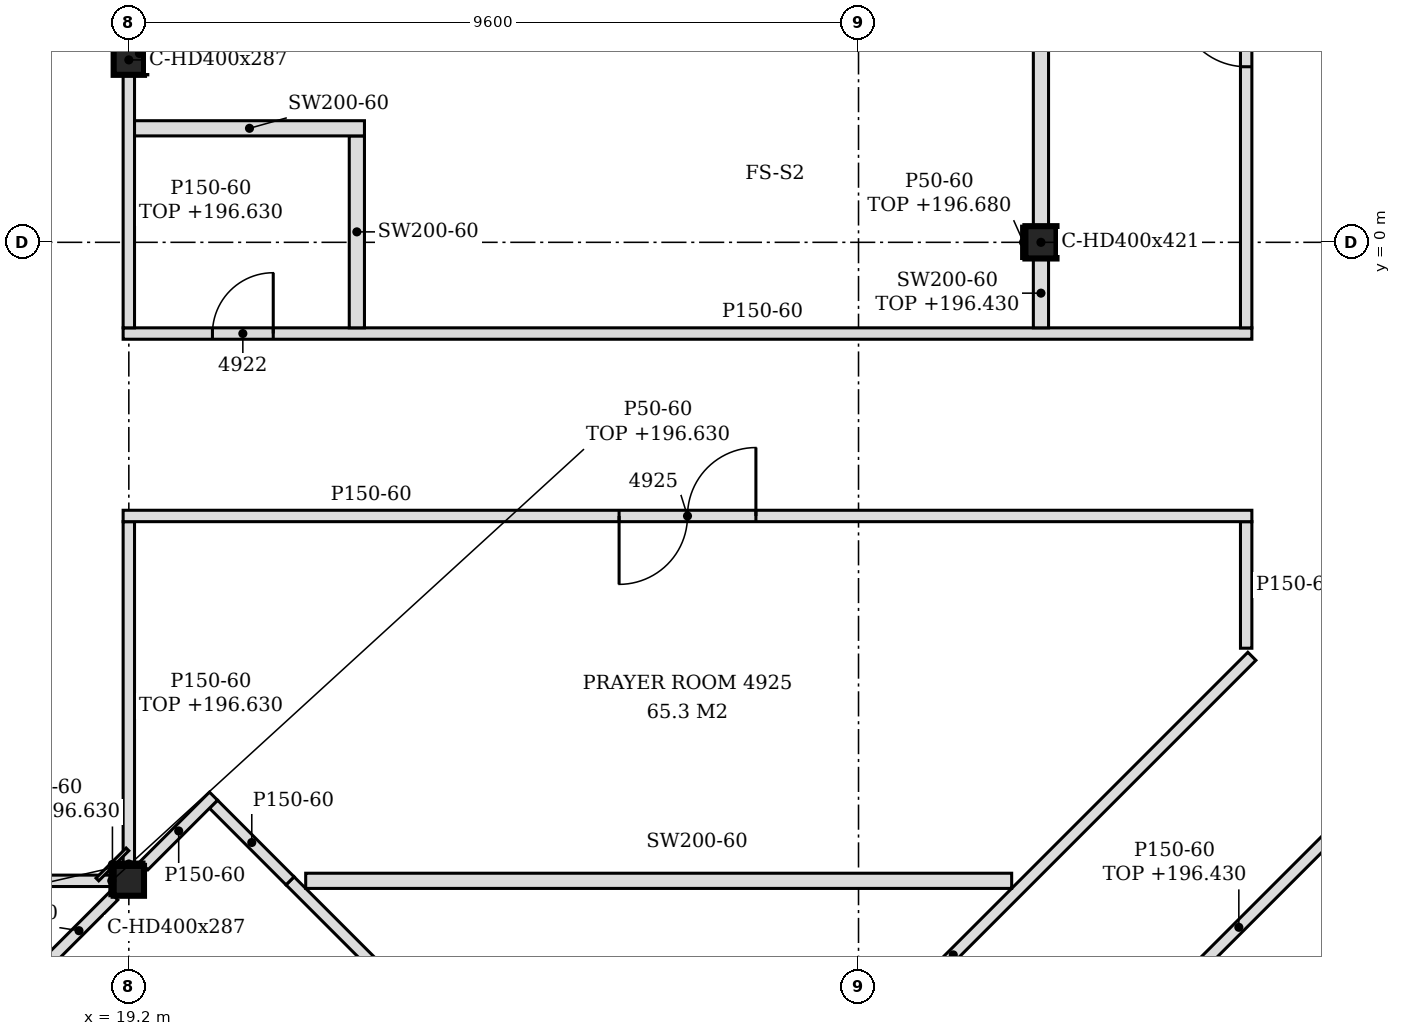
"""IFC4 building model, lengths in metres.
Left out: names, types, materials, properties, quantities, classifications, styles, units other than length and angle.
Written with IfcOpenShell. Run it as: python <this file> out.ifc"""

import sys

from ifc_helpers import new_model, si_unit, direction, frame, frame_2d, origin, origin_2d, place, context, subcontext, project, spatial, polyline, rectangle, i_section, outline, extrude, element, fill, save


model = new_model("IFC4")
c1 = context("Model", 3, precision=1e-05, world=origin(), true_north=direction((0.0, 1.0)))
c2 = subcontext(c1, "Body", "Model", "MODEL_VIEW")
j1 = project(units=[si_unit("LENGTHUNIT", "METRE"), si_unit("PLANEANGLEUNIT", "RADIAN")], contexts=[c1])
p1 = place(None, origin())
s1 = spatial("IfcSite", under=j1, at=p1, CompositionType="ELEMENT")
p2 = place(p1, origin())
s2 = spatial("IfcBuilding", under=s1, at=p2, CompositionType="ELEMENT")
p3 = place(p2, frame((0.0, 0.0, 193.8)))
s3 = spatial("IfcBuildingStorey", under=s2, at=p3, CompositionType="ELEMENT", Elevation=193.8)
for number, where, z_axis, x_axis in (
    (1, (19.2, -8.4, -0.15), (0.0, 0.0, 1.0), (1.0, 0.0, 0.0)),
    (2, (19.2, 2.4, -0.15), (0.0, 0.0, 1.0), (1.0, 0.0, 0.0)),
):
    element("IfcColumn", number, at=place(p3, frame(where, z_axis=z_axis, x_axis=x_axis)), inside=s3, PredefinedType="COLUMN", context=c2, shape_type="SweptSolid", body=[
        extrude(i_section(OverallWidth=0.399, OverallDepth=0.393, WebThickness=0.023, FlangeThickness=0.037, FilletRadius=0.015, at=origin_2d()), origin(), (0.0, 0.0, 1.0), 3.6),
    ])
p4 = place(p3, frame((31.2, 0.0, -0.15), z_axis=(0.0, 0.0, 1.0), x_axis=(1.0, 0.0, 0.0)))
e3 = element("IfcColumn", 3, at=p4, inside=s3, PredefinedType="COLUMN", context=c2, shape_type="SweptSolid", body=[
    extrude(i_section(OverallWidth=0.409, OverallDepth=0.425, WebThickness=0.033, FlangeThickness=0.052, FilletRadius=0.015, at=origin_2d()), origin(), (0.0, 0.0, 1.0), 3.6),
])
p5 = place(p3, frame((25.543, -17.272, 0.0), z_axis=(0.0, 0.0, 1.0), x_axis=(0.707106781187, 0.707106781187, 0.0)))
e4 = element("IfcWall", 4, at=p5, inside=s3, PredefinedType="PARTITIONING", context=c2, shape_type="SweptSolid", body=[
    extrude(rectangle(XDim=15.319, YDim=0.15, at=frame_2d((7.659, 0.0))), origin(), (0.0, 0.0, 1.0), 2.63),
])
p6 = place(p5, frame((1.623, 0.0, 0.0)))
e5 = element("IfcOpeningElement", 5, at=p6, cuts=e4, PredefinedType="OPENING", context=c2, shape_type="SweptSolid", body=[
    extrude(rectangle(XDim=0.9, YDim=2.1, at=frame_2d((0.45, 1.05))), frame((0.0, 0.085, 0.0), z_axis=(0.0, -1.0, 0.0), x_axis=(1.0, 0.0, 0.0)), (0.0, 0.0, 1.0), 0.17),
])
p7 = place(p5, frame((7.145, 0.0, 0.0)))
e6 = element("IfcOpeningElement", 6, at=p7, cuts=e4, PredefinedType="OPENING", context=c2, shape_type="SweptSolid", body=[
    extrude(rectangle(XDim=0.9, YDim=2.1, at=frame_2d((0.45, 1.05))), frame((0.0, 0.085, 0.0), z_axis=(0.0, -1.0, 0.0), x_axis=(1.0, 0.0, 0.0)), (0.0, 0.0, 1.0), 0.17),
])
p8 = place(p3, frame((26.118, -13.303, 0.0), z_axis=(0.0, 0.0, 1.0), x_axis=(0.707117766991, 0.707095795212, 0.0)))
e7 = element("IfcWall", 7, at=p8, inside=s3, PredefinedType="PARTITIONING", context=c2, shape_type="SweptSolid", body=[
    extrude(rectangle(XDim=11.112, YDim=0.15, at=frame_2d((5.556, 0.0))), origin(), (0.0, 0.0, 1.0), 2.63),
])
p9 = place(p3, frame((26.118, -13.197, 0.0), z_axis=(0.0, 0.0, 1.0), x_axis=(-0.707088787045, 0.70712477487, 0.0)))
e8 = element("IfcWall", 8, at=p9, inside=s3, PredefinedType="PARTITIONING", context=c2, shape_type="SweptSolid", body=[
    extrude(rectangle(XDim=6.784, YDim=0.15, at=frame_2d((3.392, 0.0))), origin(), (0.0, 0.0, 1.0), 2.88),
])
p10 = place(p9, frame((2.905, 0.0, 0.0)))
e9 = element("IfcOpeningElement", 9, at=p10, cuts=e8, PredefinedType="OPENING", context=c2, shape_type="SweptSolid", body=[
    extrude(rectangle(XDim=0.9, YDim=2.1, at=frame_2d((0.45, 1.05))), frame((0.0, 0.085, 0.0), z_axis=(0.0, -1.0, 0.0), x_axis=(1.0, 0.0, 0.0)), (0.0, 0.0, 1.0), 0.17),
])
p11 = place(p3, frame((18.086, -9.514, 0.0), z_axis=(0.0, 0.0, 1.0), x_axis=(0.707106781187, 0.707106781187, 0.0)))
e10 = element("IfcWall", 10, at=p11, inside=s3, PredefinedType="PARTITIONING", context=c2, shape_type="SweptSolid", body=[
    extrude(rectangle(XDim=1.295, YDim=0.15, at=frame_2d((0.648, 0.0))), origin(), (0.0, 0.0, 1.0), 3.45),
])
p12 = place(p3, frame((7.399, -8.4, 0.0), z_axis=(0.0, 0.0, 1.0), x_axis=(1.0, 0.0, 0.0)))
e11 = element("IfcWall", 11, at=p12, inside=s3, PredefinedType="PARTITIONING", context=c2, shape_type="SweptSolid", body=[
    extrude(rectangle(XDim=11.601, YDim=0.15, at=frame_2d((5.801, 0.0))), origin(), (0.0, 0.0, 1.0), 2.83),
])
p13 = place(p12, frame((0.551, 0.0, 0.0)))
e12 = element("IfcOpeningElement", 12, at=p13, cuts=e11, PredefinedType="OPENING", context=c2, shape_type="SweptSolid", body=[
    extrude(rectangle(XDim=0.9, YDim=2.1, at=frame_2d((0.45, 1.05))), frame((0.0, 0.085, 0.0), z_axis=(0.0, -1.0, 0.0), x_axis=(1.0, 0.0, 0.0)), (0.0, 0.0, 1.0), 0.17),
])
p14 = place(p3, frame((21.321, -8.4, 0.0), z_axis=(0.0, 0.0, 1.0), x_axis=(-0.706763941595, 0.707449454633, 0.0)))
e13 = element("IfcWall", 13, at=p14, inside=s3, PredefinedType="PARTITIONING", context=c2, shape_type="SweptSolid", body=[
    extrude(rectangle(XDim=1.425, YDim=0.15, at=frame_2d((0.712, 0.0))), origin(), (0.0, 0.0, 1.0), 3.45),
])
p15 = place(p3, frame((21.527, -8.4, 0.0), z_axis=(0.0, 0.0, 1.0), x_axis=(1.0, 0.0, 0.0)))
e14 = element("IfcWall", 14, at=p15, inside=s3, PredefinedType="PARTITIONING", context=c2, shape_type="SweptSolid", body=[
    extrude(rectangle(XDim=9.288, YDim=0.2, at=frame_2d((4.644, 0.0))), origin(), (0.0, 0.0, 1.0), 3.45),
])
p16 = place(p3, frame((19.2, -8.204, 0.0), z_axis=(0.0, 0.0, 1.0), x_axis=(0.0, 1.0, 0.0)))
e15 = element("IfcWall", 15, at=p16, inside=s3, PredefinedType="PARTITIONING", context=c2, shape_type="SweptSolid", body=[
    extrude(rectangle(XDim=4.529, YDim=0.15, at=frame_2d((2.264, 0.0))), origin(), (0.0, 0.0, 1.0), 2.83),
])
p17 = place(p3, frame((19.398, -8.202, 0.0), z_axis=(0.0, 0.0, 1.0), x_axis=(0.707200993001, 0.707012556818, 0.0)))
e16 = element("IfcWall", 16, at=p17, inside=s3, PredefinedType="PARTITIONING", context=c2, shape_type="SweptSolid", body=[
    extrude(rectangle(XDim=1.296, YDim=0.15, at=frame_2d((0.648, 0.0))), origin(), (0.0, 0.0, 1.0), 3.45),
])
p18 = place(p3, frame((33.9, -5.34, 0.0), z_axis=(0.0, 0.0, 1.0), x_axis=(0.0, 1.0, 0.0)))
e17 = element("IfcWall", 17, at=p18, inside=s3, PredefinedType="PARTITIONING", context=c2, shape_type="SweptSolid", body=[
    extrude(outline(polyline([(0.0, 0.0), (1.665, 0.0), (1.665, 3.45), (0.79, 3.45), (0.788, 2.93), (0.59, 2.93), (0.588, 3.45), (0.0, 3.45), (0.0, 0.0)])), frame((0.0, 0.075, 0.0), z_axis=(0.0, -1.0, 0.0), x_axis=(1.0, 0.0, 0.0)), (0.0, 0.0, 1.0), 0.15),
])
p19 = place(p3, frame((19.125, -3.6, 0.0), z_axis=(0.0, 0.0, 1.0), x_axis=(1.0, 0.0, 0.0)))
e18 = element("IfcWall", 18, at=p19, inside=s3, PredefinedType="PARTITIONING", context=c2, shape_type="SweptSolid", body=[
    extrude(outline(polyline([(0.0, 0.0), (14.85, 0.0), (14.85, 3.45), (12.225, 3.45), (12.223, 2.63), (11.925, 2.63), (11.923, 3.45), (0.225, 3.45), (0.223, 2.83), (0.0, 2.83), (0.0, 0.0)])), frame((0.0, 0.075, 0.0), z_axis=(0.0, -1.0, 0.0), x_axis=(1.0, 0.0, 0.0)), (0.0, 0.0, 1.0), 0.15),
])
p20 = place(p19, frame((6.525, 0.0, 0.0)))
e19 = element("IfcOpeningElement", 19, at=p20, cuts=e18, PredefinedType="OPENING", context=c2, shape_type="SweptSolid", body=[
    extrude(rectangle(XDim=1.8, YDim=2.1, at=frame_2d((0.9, 1.05))), frame((0.0, 0.085, 0.0), z_axis=(0.0, -1.0, 0.0), x_axis=(1.0, 0.0, 0.0)), (0.0, 0.0, 1.0), 0.17),
])
p21 = place(p3, frame((19.125, -1.2, 0.0), z_axis=(0.0, 0.0, 1.0), x_axis=(1.0, 0.0, 0.0)))
e20 = element("IfcWall", 20, at=p21, inside=s3, PredefinedType="PARTITIONING", context=c2, shape_type="SweptSolid", body=[
    extrude(outline(polyline([(0.0, 0.0), (14.85, 0.0), (14.85, 3.45), (12.225, 3.45), (12.223, 2.63), (11.925, 2.63), (11.923, 3.45), (0.225, 3.45), (0.223, 2.83), (0.0, 2.83), (0.0, 0.0)])), frame((0.0, 0.075, 0.0), z_axis=(0.0, -1.0, 0.0), x_axis=(1.0, 0.0, 0.0)), (0.0, 0.0, 1.0), 0.15),
])
p22 = place(p21, frame((1.175, 0.0, 0.0)))
e21 = element("IfcOpeningElement", 21, at=p22, cuts=e20, PredefinedType="OPENING", context=c2, shape_type="SweptSolid", body=[
    extrude(rectangle(XDim=0.8, YDim=2.1, at=frame_2d((0.4, 1.05))), frame((0.0, 0.085, 0.0), z_axis=(0.0, -1.0, 0.0), x_axis=(1.0, 0.0, 0.0)), (0.0, 0.0, 1.0), 0.17),
])
p23 = place(p3, frame((19.2, -1.125, 0.0), z_axis=(0.0, 0.0, 1.0), x_axis=(0.0, 1.0, 0.0)))
e22 = element("IfcWall", 22, at=p23, inside=s3, PredefinedType="PARTITIONING", context=c2, shape_type="SweptSolid", body=[
    extrude(rectangle(XDim=3.329, YDim=0.15, at=frame_2d((1.664, 0.0))), origin(), (0.0, 0.0, 1.0), 2.83),
])
p24 = place(p3, frame((22.2, -1.125, 0.0), z_axis=(0.0, 0.0, 1.0), x_axis=(0.0, 1.0, 0.0)))
e23 = element("IfcWall", 23, at=p24, inside=s3, PredefinedType="PARTITIONING", context=c2, shape_type="SweptSolid", body=[
    extrude(outline(polyline([(0.0, 0.0), (2.525, 0.0), (2.525, 3.45), (1.38, 3.45), (1.378, 2.88), (1.17, 2.88), (1.168, 3.45), (0.0, 3.45), (0.0, 0.0)])), frame((0.0, 0.1, 0.0), z_axis=(0.0, -1.0, 0.0), x_axis=(1.0, 0.0, 0.0)), (0.0, 0.0, 1.0), 0.2),
])
p25 = place(p3, frame((31.2, -1.125, 0.0), z_axis=(0.0, 0.0, 1.0), x_axis=(0.0, 1.0, 0.0)))
e24 = element("IfcWall", 24, at=p25, inside=s3, PredefinedType="PARTITIONING", context=c2, shape_type="SweptSolid", body=[
    extrude(rectangle(XDim=0.913, YDim=0.2, at=frame_2d((0.456, 0.0))), origin(), (0.0, 0.0, 1.0), 2.63),
])
p26 = place(p3, frame((33.9, -1.125, 0.0), z_axis=(0.0, 0.0, 1.0), x_axis=(0.0, 1.0, 0.0)))
e25 = element("IfcWall", 25, at=p26, inside=s3, PredefinedType="PARTITIONING", context=c2, shape_type="SweptSolid", body=[
    extrude(outline(polyline([(0.0, 0.0), (7.952, 0.0), (7.952, 3.45), (6.175, 3.45), (6.173, 2.93), (5.975, 2.93), (5.973, 3.45), (1.375, 3.45), (1.373, 2.93), (1.175, 2.93), (1.173, 3.45), (0.0, 3.45), (0.0, 0.0)])), frame((0.0, 0.075, 0.0), z_axis=(0.0, -1.0, 0.0), x_axis=(1.0, 0.0, 0.0)), (0.0, 0.0, 1.0), 0.15),
])
p27 = place(p26, frame((3.435, 0.0, 0.0)))
e26 = element("IfcOpeningElement", 26, at=p27, cuts=e25, PredefinedType="OPENING", context=c2, shape_type="SweptSolid", body=[
    extrude(rectangle(XDim=0.9, YDim=2.1, at=frame_2d((0.45, 1.05))), frame((0.0, 0.085, 0.0), z_axis=(0.0, -1.0, 0.0), x_axis=(1.0, 0.0, 0.0)), (0.0, 0.0, 1.0), 0.17),
])
p28 = place(p3, frame((31.2, 0.212, 0.0), z_axis=(0.0, 0.0, 1.0), x_axis=(0.0, 1.0, 0.0)))
e27 = element("IfcWall", 27, at=p28, inside=s3, PredefinedType="PARTITIONING", context=c2, shape_type="SweptSolid", body=[
    extrude(rectangle(XDim=9.175, YDim=0.2, at=frame_2d((4.587, 0.0))), origin(), (0.0, 0.0, 1.0), 2.93),
])
p29 = place(p3, frame((19.275, 1.5, 0.0), z_axis=(0.0, 0.0, 1.0), x_axis=(1.0, 0.0, 0.0)))
e28 = element("IfcWall", 28, at=p29, inside=s3, PredefinedType="PARTITIONING", context=c2, shape_type="SweptSolid", body=[
    extrude(outline(polyline([(0.0, 0.0), (3.025, 0.0), (3.025, 3.45), (0.075, 3.45), (0.073, 2.83), (0.0, 2.83), (0.0, 0.0)])), frame((0.0, 0.1, 0.0), z_axis=(0.0, -1.0, 0.0), x_axis=(1.0, 0.0, 0.0)), (0.0, 0.0, 1.0), 0.2),
])
p30 = place(p3, frame((18.786, -8.382, 0.0), z_axis=(0.0, 0.0, 1.0), x_axis=(0.707106781187, 0.707106781187, 0.0)))
e29 = element("IfcWall", 29, at=p30, inside=s3, PredefinedType="PARTITIONING", context=c2, shape_type="SweptSolid", body=[
    extrude(rectangle(XDim=0.56, YDim=0.05, at=frame_2d((0.28, 0.0))), origin(), (0.0, 0.0, 1.0), 2.83),
])
p31 = place(p3, frame((19.0, -8.178, 0.0), z_axis=(0.0, 0.0, 1.0), x_axis=(1.0, 0.0, 0.0)))
e30 = element("IfcWall", 30, at=p31, inside=s3, PredefinedType="PARTITIONING", context=c2, shape_type="SweptSolid", body=[
    extrude(rectangle(XDim=0.399, YDim=0.05, at=frame_2d((0.199, 0.0))), origin(), (0.0, 0.0, 1.0), 2.83),
])
p32 = place(p3, frame((18.976, -8.596, 0.0), z_axis=(0.0, 0.0, 1.0), x_axis=(0.0, 1.0, 0.0)))
e31 = element("IfcWall", 31, at=p32, inside=s3, PredefinedType="PARTITIONING", context=c2, shape_type="SweptSolid", body=[
    extrude(rectangle(XDim=0.393, YDim=0.05, at=frame_2d((0.196, 0.0))), origin(), (0.0, 0.0, 1.0), 2.83),
])
p33 = place(p3, frame((19.425, 2.204, 0.0), z_axis=(0.0, 0.0, 1.0), x_axis=(0.0, 1.0, 0.0)))
e32 = element("IfcWall", 32, at=p33, inside=s3, PredefinedType="PARTITIONING", context=c2, shape_type="SweptSolid", body=[
    extrude(rectangle(XDim=0.393, YDim=0.05, at=frame_2d((0.196, 0.0))), origin(), (0.0, 0.0, 1.0), 3.45),
])
p34 = place(p3, frame((30.97, -0.212, 0.0), z_axis=(0.0, 0.0, 1.0), x_axis=(0.0, 1.0, 0.0)))
e33 = element("IfcWall", 33, at=p34, inside=s3, PredefinedType="PARTITIONING", context=c2, shape_type="SweptSolid", body=[
    extrude(rectangle(XDim=0.425, YDim=0.05, at=frame_2d((0.212, 0.0))), origin(), (0.0, 0.0, 1.0), 2.88),
])
p35 = place(p22, origin())
e34 = element("IfcDoor", 34, at=p35, inside=s3, OperationType="SINGLE_SWING_RIGHT", PredefinedType="DOOR", context=c2, shape_type="SweptSolid", body=[
    extrude(rectangle(XDim=0.8, YDim=2.1, at=frame_2d((0.4, 1.05))), frame((0.0, 0.025, 0.0), z_axis=(0.0, -1.0, 0.0), x_axis=(1.0, 0.0, 0.0)), (0.0, 0.0, 1.0), 0.05),
])
fill(e21, e34)
p36 = place(p20, frame((1.8, 0.0, 0.0), z_axis=(0.0, 0.0, 1.0), x_axis=(-1.0, 0.0, 0.0)))
e35 = element("IfcDoor", 35, at=p36, inside=s3, OperationType="DOUBLE_DOOR_SINGLE_SWING", PredefinedType="DOOR", context=c2, shape_type="SweptSolid", body=[
    extrude(rectangle(XDim=1.8, YDim=2.1, at=frame_2d((0.9, 1.05))), frame((0.0, 0.025, 0.0), z_axis=(0.0, -1.0, 0.0), x_axis=(1.0, 0.0, 0.0)), (0.0, 0.0, 1.0), 0.05),
])
fill(e19, e35)
p37 = place(p27, origin())
e36 = element("IfcDoor", 36, at=p37, inside=s3, OperationType="SINGLE_SWING_RIGHT", PredefinedType="DOOR", context=c2, shape_type="SweptSolid", body=[
    extrude(rectangle(XDim=0.9, YDim=2.1, at=frame_2d((0.45, 1.05))), frame((0.0, 0.025, 0.0), z_axis=(0.0, -1.0, 0.0), x_axis=(1.0, 0.0, 0.0)), (0.0, 0.0, 1.0), 0.05),
])
fill(e26, e36)
save(model, sys.argv[1])
